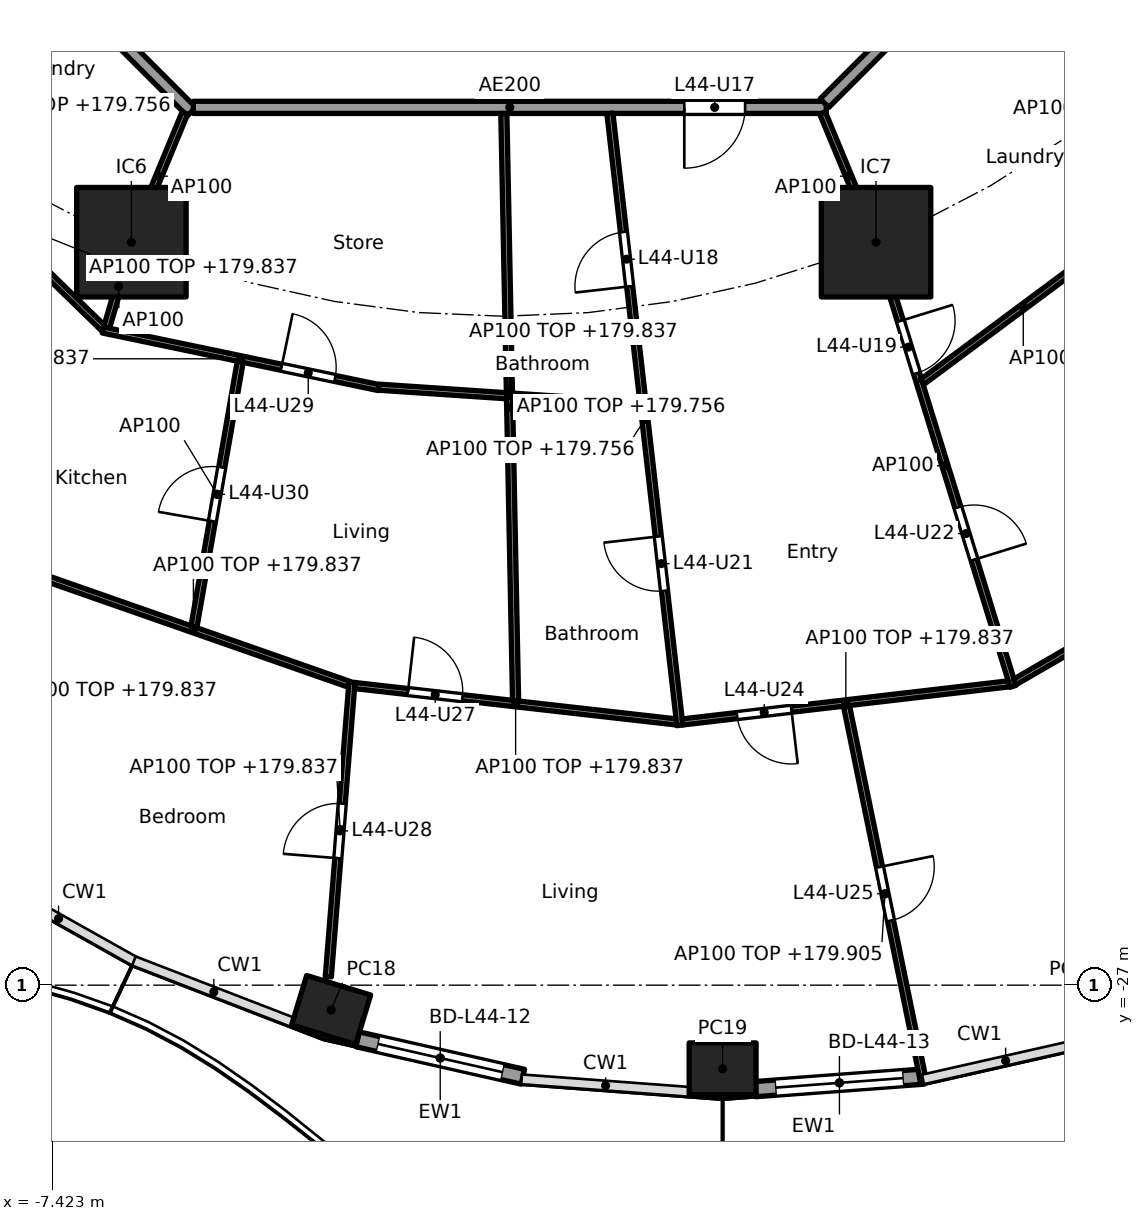
"""IFC4 building model, lengths in metres.
Left out: names, types, materials, properties, quantities, classifications, styles, units other than length and angle.
Written with IfcOpenShell. Run it as: python <this file> out.ifc"""

import sys

from ifc_helpers import new_model, si_unit, direction, frame, frame_2d, origin, origin_2d, place, context, subcontext, project, spatial, rectangle, hollow_rectangle, extrude, element, fill, save


model = new_model("IFC4")
c1 = context("Model", 3, precision=1e-05, world=origin(), true_north=direction((0.0, 1.0)))
c2 = subcontext(c1, "Body", "Model", "MODEL_VIEW")
j1 = project(units=[si_unit("LENGTHUNIT", "METRE"), si_unit("PLANEANGLEUNIT", "RADIAN")], contexts=[c1])
p1 = place(None, origin())
s1 = spatial("IfcSite", under=j1, at=p1, CompositionType="ELEMENT")
p2 = place(p1, origin())
s2 = spatial("IfcBuilding", under=s1, at=p2, CompositionType="ELEMENT")
p3 = place(p2, frame((0.0, 0.0, 177.0)))
s3 = spatial("IfcBuildingStorey", under=s2, at=p3, CompositionType="ELEMENT", Elevation=177.0)
for number, where, z_axis, x_axis in (
    (1, (-2.838, -27.408, 0.0), (0.0, 0.0, 1.0), (0.957, -0.292, 0.0)),
    (2, (3.6, -28.375, 0.0), (0.0, 0.0, 1.0), (1.0, 0.0, 0.0)),
):
    element("IfcColumn", number, at=place(p3, frame(where, z_axis=z_axis, x_axis=x_axis)), inside=s3, PredefinedType="COLUMN", context=c2, shape_type="SweptSolid", body=[
        extrude(hollow_rectangle(XDim=1.1, YDim=0.85, WallThickness=0.036, at=origin_2d()), origin(), (0.0, 0.0, 1.0), 3.7),
    ])
for number, where, z_axis, x_axis in (
    (3, (-6.123, -14.782, 0.0), (0.0, 0.0, 1.0), (1.0, 0.0, 0.0)),
    (4, (6.123, -14.782, 0.0), (0.0, 0.0, 1.0), (1.0, 0.0, 0.0)),
):
    element("IfcColumn", number, at=place(p3, frame(where, z_axis=z_axis, x_axis=x_axis)), inside=s3, PredefinedType="COLUMN", context=c2, shape_type="SweptSolid", body=[
        extrude(rectangle(XDim=1.8, YDim=1.8, at=origin_2d()), origin(), (0.0, 0.0, 1.0), 3.7),
    ])
p4 = place(p3, frame((0.315, -28.506, 0.0), z_axis=(0.0, 0.0, 1.0), x_axis=(-0.975324329911, 0.220776926974, 0.0)))
e5 = element("IfcWall", 5, at=p4, inside=s3, PredefinedType="SOLIDWALL", context=c2, shape_type="SweptSolid", body=[
    extrude(rectangle(XDim=2.788, YDim=0.25, at=frame_2d((1.394, 0.0))), origin(), (0.0, 0.0, 1.0), 3.44),
])
p5 = place(p4, frame((0.344, 0.0, 0.0)))
e6 = element("IfcOpeningElement", 6, at=p5, cuts=e5, PredefinedType="OPENING", context=c2, shape_type="SweptSolid", body=[
    extrude(rectangle(XDim=2.1, YDim=2.4, at=frame_2d((1.05, 1.2))), frame((0.0, 0.135, 0.0), z_axis=(0.0, -1.0, 0.0), x_axis=(1.0, 0.0, 0.0)), (0.0, 0.0, 1.0), 0.27),
])
p6 = place(p3, frame((6.903, -28.503, 0.0), z_axis=(0.0, 0.0, 1.0), x_axis=(-0.997232064422, -0.074351931305, 0.0)))
e7 = element("IfcWall", 7, at=p6, inside=s3, PredefinedType="SOLIDWALL", context=c2, shape_type="SweptSolid", body=[
    extrude(rectangle(XDim=2.771, YDim=0.25, at=frame_2d((1.386, 0.0))), origin(), (0.0, 0.0, 1.0), 3.44),
])
p7 = place(p6, frame((0.336, 0.0, 0.0)))
e8 = element("IfcOpeningElement", 8, at=p7, cuts=e7, PredefinedType="OPENING", context=c2, shape_type="SweptSolid", body=[
    extrude(rectangle(XDim=2.1, YDim=2.4, at=frame_2d((1.05, 1.2))), frame((0.0, 0.135, 0.0), z_axis=(0.0, -1.0, 0.0), x_axis=(1.0, 0.0, 0.0)), (0.0, 0.0, 1.0), 0.27),
])
p8 = place(p3, frame((-12.635, -5.134, 0.0), z_axis=(0.0, 0.0, 1.0), x_axis=(0.707106781187, -0.707106781187, 0.0)))
e9 = element("IfcWall", 9, at=p8, inside=s3, PredefinedType="PARTITIONING", context=c2, shape_type="SweptSolid", body=[
    extrude(rectangle(XDim=10.609, YDim=0.2, at=frame_2d((5.305, 0.0))), origin(), (0.0, 0.0, 1.0), 3.44),
])
p9 = place(p3, frame((-5.104, -12.565, 0.0), z_axis=(0.0, 0.0, 1.0), x_axis=(1.0, 0.0, 0.0)))
e10 = element("IfcWall", 10, at=p9, inside=s3, PredefinedType="PARTITIONING", context=c2, shape_type="SweptSolid", body=[
    extrude(rectangle(XDim=10.409, YDim=0.2, at=frame_2d((5.205, 0.0))), origin(), (0.0, 0.0, 1.0), 3.44),
])
p10 = place(p9, frame((8.074, 0.0, 0.0)))
e11 = element("IfcOpeningElement", 11, at=p10, cuts=e10, PredefinedType="OPENING", context=c2, shape_type="SweptSolid", body=[
    extrude(rectangle(XDim=1.0, YDim=2.1, at=frame_2d((0.5, 1.05))), frame((0.0, 0.11, 0.0), z_axis=(0.0, -1.0, 0.0), x_axis=(1.0, 0.0, 0.0)), (0.0, 0.0, 1.0), 0.22),
])
p11 = place(p3, frame((5.275, -12.494, 0.0), z_axis=(0.0, 0.0, 1.0), x_axis=(0.707106781187, 0.707106781187, 0.0)))
e12 = element("IfcWall", 12, at=p11, inside=s3, PredefinedType="PARTITIONING", context=c2, shape_type="SweptSolid", body=[
    extrude(rectangle(XDim=10.409, YDim=0.2, at=frame_2d((5.205, 0.0))), origin(), (0.0, 0.0, 1.0), 3.44),
])
p12 = place(p3, frame((-9.627, -13.238, 0.0), z_axis=(0.0, 0.0, 1.0), x_axis=(0.716946269374, -0.697128429223, 0.0)))
e13 = element("IfcWall", 13, at=p12, inside=s3, PredefinedType="PARTITIONING", context=c2, shape_type="SweptSolid", body=[
    extrude(rectangle(XDim=4.25, YDim=0.1, at=frame_2d((2.125, 0.0))), origin(), (0.0, 0.0, 1.0), 2.837),
])
p13 = place(p12, frame((1.145, 0.0, 0.0)))
e14 = element("IfcOpeningElement", 14, at=p13, cuts=e13, PredefinedType="OPENING", context=c2, shape_type="SweptSolid", body=[
    extrude(rectangle(XDim=0.9, YDim=2.1, at=frame_2d((0.45, 1.05))), frame((0.0, 0.06, 0.0), z_axis=(0.0, -1.0, 0.0), x_axis=(1.0, 0.0, 0.0)), (0.0, 0.0, 1.0), 0.12),
])
p14 = place(p3, frame((-5.243, -12.657, 0.0), z_axis=(0.0, 0.0, 1.0), x_axis=(-0.382719158442, -0.923864733477, 0.0)))
e15 = element("IfcWall", 15, at=p14, inside=s3, PredefinedType="PARTITIONING", context=c2, shape_type="SweptSolid", body=[
    extrude(rectangle(XDim=2.25, YDim=0.1, at=frame_2d((1.125, 0.0))), origin(), (0.0, 0.0, 1.0), 3.44),
])
p15 = place(p3, frame((-6.137, -14.831, 0.0), z_axis=(0.0, 0.0, 1.0), x_axis=(-0.2785069197, -0.960434222464, 0.0)))
e16 = element("IfcWall", 16, at=p15, inside=s3, PredefinedType="PARTITIONING", context=c2, shape_type="SweptSolid", body=[
    extrude(rectangle(XDim=1.413, YDim=0.1, at=frame_2d((0.707, 0.0))), origin(), (0.0, 0.0, 1.0), 3.44),
])
p16 = place(p3, frame((-6.594, -16.226, 0.0), z_axis=(0.0, 0.0, 1.0), x_axis=(0.978899284405, -0.204343316484, 0.0)))
e17 = element("IfcWall", 17, at=p16, inside=s3, PredefinedType="PARTITIONING", context=c2, shape_type="SweptSolid", body=[
    extrude(rectangle(XDim=4.636, YDim=0.1, at=frame_2d((2.318, 0.0))), origin(), (0.0, 0.0, 1.0), 2.837),
])
p17 = place(p16, frame((3.002, 0.0, 0.0)))
e18 = element("IfcOpeningElement", 18, at=p17, cuts=e17, PredefinedType="OPENING", context=c2, shape_type="SweptSolid", body=[
    extrude(rectangle(XDim=0.9, YDim=2.1, at=frame_2d((0.45, 1.05))), frame((0.0, 0.06, 0.0), z_axis=(0.0, -1.0, 0.0), x_axis=(1.0, 0.0, 0.0)), (0.0, 0.0, 1.0), 0.12),
])
p18 = place(p3, frame((-7.66, -20.262, 0.0), z_axis=(0.0, 0.0, 1.0), x_axis=(0.943911038661, -0.330199865375, 0.0)))
e19 = element("IfcWall", 19, at=p18, inside=s3, PredefinedType="PARTITIONING", context=c2, shape_type="SweptSolid", body=[
    extrude(rectangle(XDim=5.417, YDim=0.1, at=frame_2d((2.709, 0.0))), origin(), (0.0, 0.0, 1.0), 2.837),
])
p19 = place(p3, frame((-4.333, -16.749, 0.0), z_axis=(0.0, 0.0, 1.0), x_axis=(-0.172053721569, -0.985087568135, 0.0)))
e20 = element("IfcWall", 20, at=p19, inside=s3, PredefinedType="PARTITIONING", context=c2, shape_type="SweptSolid", body=[
    extrude(rectangle(XDim=4.424, YDim=0.1, at=frame_2d((2.212, 0.0))), origin(), (0.0, 0.0, 1.0), 3.44),
])
p20 = place(p19, frame((1.762, 0.0, 0.0)))
e21 = element("IfcOpeningElement", 21, at=p20, cuts=e20, PredefinedType="OPENING", context=c2, shape_type="SweptSolid", body=[
    extrude(rectangle(XDim=0.9, YDim=2.1, at=frame_2d((0.45, 1.05))), frame((0.0, 0.06, 0.0), z_axis=(0.0, -1.0, 0.0), x_axis=(1.0, 0.0, 0.0)), (0.0, 0.0, 1.0), 0.12),
])
p21 = place(p3, frame((-2.055, -17.166, 0.0), z_axis=(0.0, 0.0, 1.0), x_axis=(0.997754717554, -0.066974051687, 0.0)))
e22 = element("IfcWall", 22, at=p21, inside=s3, PredefinedType="PARTITIONING", context=c2, shape_type="SweptSolid", body=[
    extrude(rectangle(XDim=4.309, YDim=0.1, at=frame_2d((2.154, 0.0))), origin(), (0.0, 0.0, 1.0), 2.837),
])
p22 = place(p3, frame((-2.495, -22.017, 0.0), z_axis=(0.0, 0.0, 1.0), x_axis=(-0.080150660566, -0.99678276049, 0.0)))
e23 = element("IfcWall", 23, at=p22, inside=s3, PredefinedType="PARTITIONING", context=c2, shape_type="SweptSolid", body=[
    extrude(rectangle(XDim=4.858, YDim=0.1, at=frame_2d((2.429, 0.0))), origin(), (0.0, 0.0, 1.0), 2.837),
])
p23 = place(p22, frame((2.004, 0.0, 0.0)))
e24 = element("IfcOpeningElement", 24, at=p23, cuts=e23, PredefinedType="OPENING", context=c2, shape_type="SweptSolid", body=[
    extrude(rectangle(XDim=0.9, YDim=2.1, at=frame_2d((0.45, 1.05))), frame((0.0, 0.06, 0.0), z_axis=(0.0, -1.0, 0.0), x_axis=(1.0, 0.0, 0.0)), (0.0, 0.0, 1.0), 0.12),
])
p24 = place(p3, frame((-2.449, -22.073, 0.0), z_axis=(0.0, 0.0, 1.0), x_axis=(0.993660315081, -0.112424099879, 0.0)))
e25 = element("IfcWall", 25, at=p24, inside=s3, PredefinedType="PARTITIONING", context=c2, shape_type="SweptSolid", body=[
    extrude(rectangle(XDim=5.325, YDim=0.1, at=frame_2d((2.662, 0.0))), origin(), (0.0, 0.0, 1.0), 2.837),
])
p25 = place(p24, frame((0.881, 0.0, 0.0)))
e26 = element("IfcOpeningElement", 26, at=p25, cuts=e25, PredefinedType="OPENING", context=c2, shape_type="SweptSolid", body=[
    extrude(rectangle(XDim=0.9, YDim=2.1, at=frame_2d((0.45, 1.05))), frame((0.0, 0.06, 0.0), z_axis=(0.0, -1.0, 0.0), x_axis=(1.0, 0.0, 0.0)), (0.0, 0.0, 1.0), 0.12),
])
p26 = place(p3, frame((0.002, -12.665, 0.0), z_axis=(0.0, 0.0, 1.0), x_axis=(0.019992969345, -0.999800120613, 0.0)))
e27 = element("IfcWall", 27, at=p26, inside=s3, PredefinedType="PARTITIONING", context=c2, shape_type="SweptSolid", body=[
    extrude(rectangle(XDim=9.659, YDim=0.1, at=frame_2d((4.83, 0.0))), origin(), (0.0, 0.0, 1.0), 2.756),
])
p27 = place(p3, frame((1.746, -12.664, 0.0), z_axis=(0.0, 0.0, 1.0), x_axis=(0.113629529561, -0.993523190475, 0.0)))
e28 = element("IfcWall", 28, at=p27, inside=s3, PredefinedType="PARTITIONING", context=c2, shape_type="SweptSolid", body=[
    extrude(rectangle(XDim=10.128, YDim=0.1, at=frame_2d((5.064, 0.0))), origin(), (0.0, 0.0, 1.0), 2.756),
])
p28 = place(p27, frame((1.962, 0.0, 0.0)))
e29 = element("IfcOpeningElement", 29, at=p28, cuts=e28, PredefinedType="OPENING", context=c2, shape_type="SweptSolid", body=[
    extrude(rectangle(XDim=0.9, YDim=2.1, at=frame_2d((0.45, 1.05))), frame((0.0, 0.06, 0.0), z_axis=(0.0, -1.0, 0.0), x_axis=(1.0, 0.0, 0.0)), (0.0, 0.0, 1.0), 0.12),
])
p29 = place(p27, frame((7.002, 0.0, 0.0)))
e30 = element("IfcOpeningElement", 30, at=p29, cuts=e28, PredefinedType="OPENING", context=c2, shape_type="SweptSolid", body=[
    extrude(rectangle(XDim=0.9, YDim=2.1, at=frame_2d((0.45, 1.05))), frame((0.0, 0.06, 0.0), z_axis=(0.0, -1.0, 0.0), x_axis=(1.0, 0.0, 0.0)), (0.0, 0.0, 1.0), 0.12),
])
p30 = place(p3, frame((2.941, -22.671, 0.0), z_axis=(0.0, 0.0, 1.0), x_axis=(0.993245806382, 0.1160291692, 0.0)))
e31 = element("IfcWall", 31, at=p30, inside=s3, PredefinedType="PARTITIONING", context=c2, shape_type="SweptSolid", body=[
    extrude(rectangle(XDim=5.408, YDim=0.1, at=frame_2d((2.704, 0.0))), origin(), (0.0, 0.0, 1.0), 2.837),
])
p31 = place(p30, frame((0.902, 0.0, 0.0)))
e32 = element("IfcOpeningElement", 32, at=p31, cuts=e31, PredefinedType="OPENING", context=c2, shape_type="SweptSolid", body=[
    extrude(rectangle(XDim=0.9, YDim=2.1, at=frame_2d((0.45, 1.05))), frame((0.0, 0.06, 0.0), z_axis=(0.0, -1.0, 0.0), x_axis=(1.0, 0.0, 0.0)), (0.0, 0.0, 1.0), 0.12),
])
p32 = place(p3, frame((5.636, -22.407, 0.0), z_axis=(0.0, 0.0, 1.0), x_axis=(0.200860375092, -0.979619880218, 0.0)))
e33 = element("IfcWall", 33, at=p32, inside=s3, PredefinedType="PARTITIONING", context=c2, shape_type="SweptSolid", body=[
    extrude(rectangle(XDim=6.311, YDim=0.1, at=frame_2d((3.155, 0.0))), origin(), (0.0, 0.0, 1.0), 2.905),
])
p33 = place(p32, frame((2.705, 0.0, 0.0)))
e34 = element("IfcOpeningElement", 34, at=p33, cuts=e33, PredefinedType="OPENING", context=c2, shape_type="SweptSolid", body=[
    extrude(rectangle(XDim=0.9, YDim=2.1, at=frame_2d((0.45, 1.05))), frame((0.0, 0.06, 0.0), z_axis=(0.0, -1.0, 0.0), x_axis=(1.0, 0.0, 0.0)), (0.0, 0.0, 1.0), 0.12),
])
p34 = place(p3, frame((5.243, -12.657, 0.0), z_axis=(0.0, 0.0, 1.0), x_axis=(0.382719158442, -0.923864733477, 0.0)))
e35 = element("IfcWall", 35, at=p34, inside=s3, PredefinedType="PARTITIONING", context=c2, shape_type="SweptSolid", body=[
    extrude(rectangle(XDim=2.25, YDim=0.1, at=frame_2d((1.125, 0.0))), origin(), (0.0, 0.0, 1.0), 3.44),
])
p35 = place(p3, frame((6.138, -14.83, 0.0), z_axis=(0.0, 0.0, 1.0), x_axis=(0.294822274121, -0.955552105687, 0.0)))
e36 = element("IfcWall", 36, at=p35, inside=s3, PredefinedType="PARTITIONING", context=c2, shape_type="SweptSolid", body=[
    extrude(rectangle(XDim=7.594, YDim=0.1, at=frame_2d((3.797, 0.0))), origin(), (0.0, 0.0, 1.0), 3.44),
])
p36 = place(p35, frame((1.306, 0.0, 0.0)))
e37 = element("IfcOpeningElement", 37, at=p36, cuts=e36, PredefinedType="OPENING", context=c2, shape_type="SweptSolid", body=[
    extrude(rectangle(XDim=0.9, YDim=2.1, at=frame_2d((0.45, 1.05))), frame((0.0, 0.06, 0.0), z_axis=(0.0, -1.0, 0.0), x_axis=(1.0, 0.0, 0.0)), (0.0, 0.0, 1.0), 0.12),
])
p37 = place(p35, frame((4.515, 0.0, 0.0)))
e38 = element("IfcOpeningElement", 38, at=p37, cuts=e36, PredefinedType="OPENING", context=c2, shape_type="SweptSolid", body=[
    extrude(rectangle(XDim=0.9, YDim=2.1, at=frame_2d((0.45, 1.05))), frame((0.0, 0.06, 0.0), z_axis=(0.0, -1.0, 0.0), x_axis=(1.0, 0.0, 0.0)), (0.0, 0.0, 1.0), 0.12),
])
p38 = place(p3, frame((6.881, -17.08, 0.0), z_axis=(0.0, 0.0, 1.0), x_axis=(0.802784956441, 0.596268659005, 0.0)))
e39 = element("IfcWall", 39, at=p38, inside=s3, PredefinedType="PARTITIONING", context=c2, shape_type="SweptSolid", body=[
    extrude(rectangle(XDim=4.142, YDim=0.1, at=frame_2d((2.071, 0.0))), origin(), (0.0, 0.0, 1.0), 2.837),
])
p39 = place(p3, frame((8.405, -22.013, 0.0), z_axis=(0.0, 0.0, 1.0), x_axis=(0.865277177388, 0.501293732547, 0.0)))
e40 = element("IfcWall", 40, at=p39, inside=s3, PredefinedType="PARTITIONING", context=c2, shape_type="SweptSolid", body=[
    extrude(rectangle(XDim=5.27, YDim=0.1, at=frame_2d((2.635, 0.0))), origin(), (0.0, 0.0, 1.0), 2.837),
])
p40 = place(p3, frame((8.943, -8.966, 0.0), z_axis=(0.0, 0.0, 1.0), x_axis=(0.587187896734, -0.809450661825, 0.0)))
e41 = element("IfcWall", 41, at=p40, inside=s3, PredefinedType="PARTITIONING", context=c2, shape_type="SweptSolid", body=[
    extrude(rectangle(XDim=4.975, YDim=0.1, at=frame_2d((2.487, 0.0))), origin(), (0.0, 0.0, 1.0), 2.756),
])
p41 = place(p40, frame((2.037, 0.0, 0.0)))
e42 = element("IfcOpeningElement", 42, at=p41, cuts=e41, PredefinedType="OPENING", context=c2, shape_type="SweptSolid", body=[
    extrude(rectangle(XDim=0.9, YDim=2.1, at=frame_2d((0.45, 1.05))), frame((0.0, 0.06, 0.0), z_axis=(0.0, -1.0, 0.0), x_axis=(1.0, 0.0, 0.0)), (0.0, 0.0, 1.0), 0.12),
])
p42 = place(p5, origin())
e43 = element("IfcDoor", 43, at=p42, inside=s3, OperationType="SLIDING_TO_LEFT", PredefinedType="DOOR", context=c2, shape_type="SweptSolid", body=[
    extrude(rectangle(XDim=2.1, YDim=2.4, at=frame_2d((1.05, 1.2))), frame((0.0, 0.025, 0.0), z_axis=(0.0, -1.0, 0.0), x_axis=(1.0, 0.0, 0.0)), (0.0, 0.0, 1.0), 0.05),
])
fill(e6, e43)
p43 = place(p7, origin())
e44 = element("IfcDoor", 44, at=p43, inside=s3, OperationType="SLIDING_TO_LEFT", PredefinedType="DOOR", context=c2, shape_type="SweptSolid", body=[
    extrude(rectangle(XDim=2.1, YDim=2.4, at=frame_2d((1.05, 1.2))), frame((0.0, 0.025, 0.0), z_axis=(0.0, -1.0, 0.0), x_axis=(1.0, 0.0, 0.0)), (0.0, 0.0, 1.0), 0.05),
])
fill(e8, e44)
p44 = place(p10, frame((1.0, 0.0, 0.0), x_axis=(-1.0, 0.0, 0.0)))
e45 = element("IfcDoor", 45, at=p44, inside=s3, OperationType="SINGLE_SWING_RIGHT", PredefinedType="DOOR", context=c2, shape_type="SweptSolid", body=[
    extrude(rectangle(XDim=1.0, YDim=2.1, at=frame_2d((0.5, 1.05))), frame((0.0, 0.025, 0.0), z_axis=(0.0, -1.0, 0.0), x_axis=(1.0, 0.0, 0.0)), (0.0, 0.0, 1.0), 0.05),
])
fill(e11, e45)
p45 = place(p28, frame((0.9, 0.0, 0.0), x_axis=(-1.0, 0.0, 0.0)))
e46 = element("IfcDoor", 46, at=p45, inside=s3, OperationType="SINGLE_SWING_LEFT", PredefinedType="DOOR", context=c2, shape_type="SweptSolid", body=[
    extrude(rectangle(XDim=0.9, YDim=2.1, at=frame_2d((0.45, 1.05))), frame((0.0, 0.025, 0.0), z_axis=(0.0, -1.0, 0.0), x_axis=(1.0, 0.0, 0.0)), (0.0, 0.0, 1.0), 0.05),
])
fill(e29, e46)
p46 = place(p36, origin())
e47 = element("IfcDoor", 47, at=p46, inside=s3, OperationType="SINGLE_SWING_LEFT", PredefinedType="DOOR", context=c2, shape_type="SweptSolid", body=[
    extrude(rectangle(XDim=0.9, YDim=2.1, at=frame_2d((0.45, 1.05))), frame((0.0, 0.025, 0.0), z_axis=(0.0, -1.0, 0.0), x_axis=(1.0, 0.0, 0.0)), (0.0, 0.0, 1.0), 0.05),
])
fill(e37, e47)
p47 = place(p29, frame((0.9, 0.0, 0.0), x_axis=(-1.0, 0.0, 0.0)))
e48 = element("IfcDoor", 48, at=p47, inside=s3, OperationType="SINGLE_SWING_RIGHT", PredefinedType="DOOR", context=c2, shape_type="SweptSolid", body=[
    extrude(rectangle(XDim=0.9, YDim=2.1, at=frame_2d((0.45, 1.05))), frame((0.0, 0.025, 0.0), z_axis=(0.0, -1.0, 0.0), x_axis=(1.0, 0.0, 0.0)), (0.0, 0.0, 1.0), 0.05),
])
fill(e30, e48)
p48 = place(p37, origin())
e49 = element("IfcDoor", 49, at=p48, inside=s3, OperationType="SINGLE_SWING_RIGHT", PredefinedType="DOOR", context=c2, shape_type="SweptSolid", body=[
    extrude(rectangle(XDim=0.9, YDim=2.1, at=frame_2d((0.45, 1.05))), frame((0.0, 0.025, 0.0), z_axis=(0.0, -1.0, 0.0), x_axis=(1.0, 0.0, 0.0)), (0.0, 0.0, 1.0), 0.05),
])
fill(e38, e49)
p49 = place(p31, frame((0.9, 0.0, 0.0), x_axis=(-1.0, 0.0, 0.0)))
e50 = element("IfcDoor", 50, at=p49, inside=s3, OperationType="SINGLE_SWING_LEFT", PredefinedType="DOOR", context=c2, shape_type="SweptSolid", body=[
    extrude(rectangle(XDim=0.9, YDim=2.1, at=frame_2d((0.45, 1.05))), frame((0.0, 0.025, 0.0), z_axis=(0.0, -1.0, 0.0), x_axis=(1.0, 0.0, 0.0)), (0.0, 0.0, 1.0), 0.05),
])
fill(e32, e50)
p50 = place(p33, origin())
e51 = element("IfcDoor", 51, at=p50, inside=s3, OperationType="SINGLE_SWING_LEFT", PredefinedType="DOOR", context=c2, shape_type="SweptSolid", body=[
    extrude(rectangle(XDim=0.9, YDim=2.1, at=frame_2d((0.45, 1.05))), frame((0.0, 0.025, 0.0), z_axis=(0.0, -1.0, 0.0), x_axis=(1.0, 0.0, 0.0)), (0.0, 0.0, 1.0), 0.05),
])
fill(e34, e51)
p51 = place(p25, origin())
e52 = element("IfcDoor", 52, at=p51, inside=s3, OperationType="SINGLE_SWING_LEFT", PredefinedType="DOOR", context=c2, shape_type="SweptSolid", body=[
    extrude(rectangle(XDim=0.9, YDim=2.1, at=frame_2d((0.45, 1.05))), frame((0.0, 0.025, 0.0), z_axis=(0.0, -1.0, 0.0), x_axis=(1.0, 0.0, 0.0)), (0.0, 0.0, 1.0), 0.05),
])
fill(e26, e52)
p52 = place(p23, frame((0.9, 0.0, 0.0), x_axis=(-1.0, 0.0, 0.0)))
e53 = element("IfcDoor", 53, at=p52, inside=s3, OperationType="SINGLE_SWING_LEFT", PredefinedType="DOOR", context=c2, shape_type="SweptSolid", body=[
    extrude(rectangle(XDim=0.9, YDim=2.1, at=frame_2d((0.45, 1.05))), frame((0.0, 0.025, 0.0), z_axis=(0.0, -1.0, 0.0), x_axis=(1.0, 0.0, 0.0)), (0.0, 0.0, 1.0), 0.05),
])
fill(e24, e53)
p53 = place(p17, origin())
e54 = element("IfcDoor", 54, at=p53, inside=s3, OperationType="SINGLE_SWING_LEFT", PredefinedType="DOOR", context=c2, shape_type="SweptSolid", body=[
    extrude(rectangle(XDim=0.9, YDim=2.1, at=frame_2d((0.45, 1.05))), frame((0.0, 0.025, 0.0), z_axis=(0.0, -1.0, 0.0), x_axis=(1.0, 0.0, 0.0)), (0.0, 0.0, 1.0), 0.05),
])
fill(e18, e54)
p54 = place(p20, frame((0.9, 0.0, 0.0), x_axis=(-1.0, 0.0, 0.0)))
e55 = element("IfcDoor", 55, at=p54, inside=s3, OperationType="SINGLE_SWING_LEFT", PredefinedType="DOOR", context=c2, shape_type="SweptSolid", body=[
    extrude(rectangle(XDim=0.9, YDim=2.1, at=frame_2d((0.45, 1.05))), frame((0.0, 0.025, 0.0), z_axis=(0.0, -1.0, 0.0), x_axis=(1.0, 0.0, 0.0)), (0.0, 0.0, 1.0), 0.05),
])
fill(e21, e55)
save(model, sys.argv[1])
